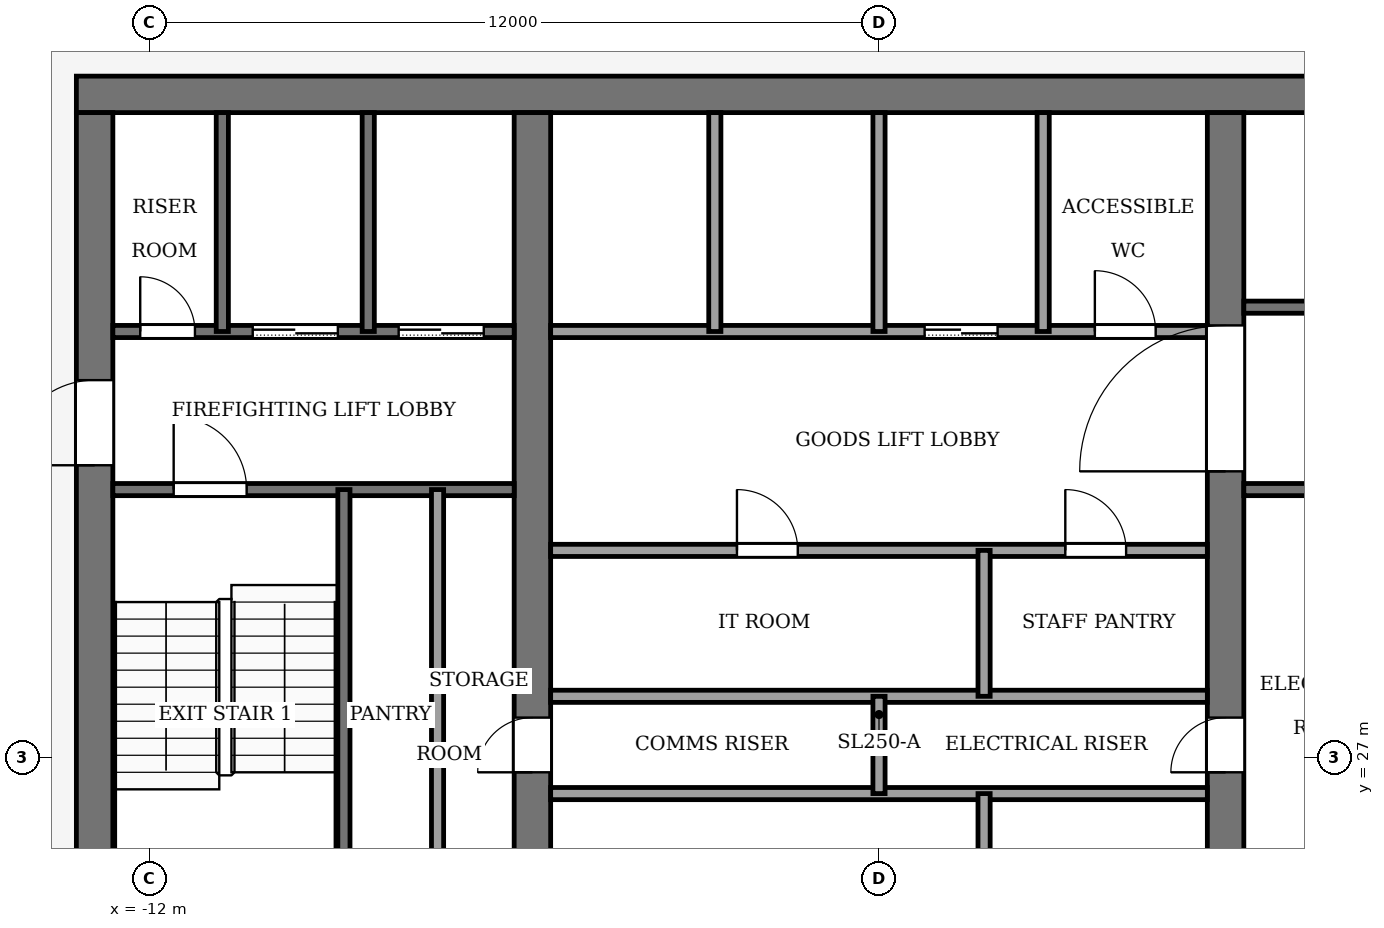
"""IFC4 building model, lengths in metres.
Left out: names, types, materials, properties, quantities, classifications, styles, units other than length and angle.
Written with IfcOpenShell. Run it as: python <this file> out.ifc"""

import sys

from ifc_helpers import new_model, si_unit, direction, frame, frame_2d, origin, place, context, subcontext, project, spatial, rectangle, extrude, element, fill, save


model = new_model("IFC4")
c1 = context("Model", 3, precision=1e-05, world=origin(), true_north=direction((0.0, 1.0)))
c2 = subcontext(c1, "Body", "Model", "MODEL_VIEW")
j1 = project(units=[si_unit("LENGTHUNIT", "METRE"), si_unit("PLANEANGLEUNIT", "RADIAN")], contexts=[c1])
p1 = place(None, origin())
s1 = spatial("IfcSite", under=j1, at=p1, CompositionType="ELEMENT")
p2 = place(p1, origin())
s2 = spatial("IfcBuilding", under=s1, at=p2, CompositionType="ELEMENT")
p3 = place(p2, frame((0.0, 0.0, 330.0)))
s3 = spatial("IfcBuildingStorey", under=s2, at=p3, CompositionType="ELEMENT", Elevation=330.0)
p4 = place(p3, frame((-13.2, 37.9, -0.13), z_axis=(0.0, 0.0, 1.0), x_axis=(1.0, 0.0, 0.0)))
e1 = element("IfcWall", 1, at=p4, inside=s3, PredefinedType="SHEAR", context=c2, shape_type="SweptSolid", body=[
    extrude(rectangle(XDim=26.4, YDim=0.6, at=frame_2d((13.2, 0.0))), origin(), (0.0, 0.0, 1.0), 3.95),
])
p5 = place(p3, frame((-12.9, 18.4, -0.13), z_axis=(0.0, 0.0, 1.0), x_axis=(0.0, 1.0, 0.0)))
e2 = element("IfcWall", 2, at=p5, inside=s3, PredefinedType="SHEAR", context=c2, shape_type="SweptSolid", body=[
    extrude(rectangle(XDim=19.2, YDim=0.6, at=frame_2d((9.6, 0.0))), origin(), (0.0, 0.0, 1.0), 3.95),
])
p6 = place(p5, frame((2.8, 0.0, 0.13)))
e3 = element("IfcOpeningElement", 3, at=p6, cuts=e2, PredefinedType="OPENING", context=c2, shape_type="SweptSolid", body=[
    extrude(rectangle(XDim=2.4, YDim=2.4, at=frame_2d((1.2, 1.2))), frame((0.0, 0.31, 0.0), z_axis=(0.0, -1.0, 0.0), x_axis=(1.0, 0.0, 0.0)), (0.0, 0.0, 1.0), 0.62),
])
p7 = place(p5, frame((13.4, 0.0, 0.13)))
e4 = element("IfcOpeningElement", 4, at=p7, cuts=e2, PredefinedType="OPENING", context=c2, shape_type="SweptSolid", body=[
    extrude(rectangle(XDim=1.4, YDim=2.2, at=frame_2d((0.7, 1.1))), frame((0.0, 0.31, 0.0), z_axis=(0.0, -1.0, 0.0), x_axis=(1.0, 0.0, 0.0)), (0.0, 0.0, 1.0), 0.62),
])
p8 = place(p3, frame((-5.7, 18.4, -0.13), z_axis=(0.0, 0.0, 1.0), x_axis=(0.0, 1.0, 0.0)))
e5 = element("IfcWall", 5, at=p8, inside=s3, PredefinedType="SHEAR", context=c2, shape_type="SweptSolid", body=[
    extrude(rectangle(XDim=19.2, YDim=0.6, at=frame_2d((9.6, 0.0))), origin(), (0.0, 0.0, 1.0), 3.95),
])
p9 = place(p8, frame((8.35, 0.0, 0.13)))
e6 = element("IfcOpeningElement", 6, at=p9, cuts=e5, PredefinedType="OPENING", context=c2, shape_type="SweptSolid", body=[
    extrude(rectangle(XDim=0.9, YDim=2.1, at=frame_2d((0.45, 1.05))), frame((0.0, 0.31, 0.0), z_axis=(0.0, -1.0, 0.0), x_axis=(1.0, 0.0, 0.0)), (0.0, 0.0, 1.0), 0.62),
])
p10 = place(p3, frame((5.7, 18.4, -0.13), z_axis=(0.0, 0.0, 1.0), x_axis=(0.0, 1.0, 0.0)))
e7 = element("IfcWall", 7, at=p10, inside=s3, PredefinedType="SHEAR", context=c2, shape_type="SweptSolid", body=[
    extrude(rectangle(XDim=19.2, YDim=0.6, at=frame_2d((9.6, 0.0))), origin(), (0.0, 0.0, 1.0), 3.95),
])
p11 = place(p10, frame((8.35, 0.0, 0.13)))
e8 = element("IfcOpeningElement", 8, at=p11, cuts=e7, PredefinedType="OPENING", context=c2, shape_type="SweptSolid", body=[
    extrude(rectangle(XDim=0.9, YDim=2.1, at=frame_2d((0.45, 1.05))), frame((0.0, 0.31, 0.0), z_axis=(0.0, -1.0, 0.0), x_axis=(1.0, 0.0, 0.0)), (0.0, 0.0, 1.0), 0.62),
])
p12 = place(p10, frame((13.3, 0.0, 0.13)))
e9 = element("IfcOpeningElement", 9, at=p12, cuts=e7, PredefinedType="OPENING", context=c2, shape_type="SweptSolid", body=[
    extrude(rectangle(XDim=2.4, YDim=2.4, at=frame_2d((1.2, 1.2))), frame((0.0, 0.31, 0.0), z_axis=(0.0, -1.0, 0.0), x_axis=(1.0, 0.0, 0.0)), (0.0, 0.0, 1.0), 0.62),
])
for number, where, z_axis, x_axis in (
    (10, (-5.4, 26.4, 0.0), (0.0, 0.0, 1.0), (1.0, 0.0, 0.0)),
    (11, (-5.4, 28.0, 0.0), (0.0, 0.0, 1.0), (1.0, 0.0, 0.0)),
):
    element("IfcWall", number, at=place(p3, frame(where, z_axis=z_axis, x_axis=x_axis)), inside=s3, PredefinedType="PARTITIONING", context=c2, shape_type="SweptSolid", body=[
        extrude(rectangle(XDim=10.8, YDim=0.2, at=frame_2d((5.4, 0.0))), origin(), (0.0, 0.0, 1.0), 3.82),
    ])
p13 = place(p3, frame((-5.4, 30.4, 0.0), z_axis=(0.0, 0.0, 1.0), x_axis=(1.0, 0.0, 0.0)))
e12 = element("IfcWall", 12, at=p13, inside=s3, PredefinedType="PARTITIONING", context=c2, shape_type="SweptSolid", body=[
    extrude(rectangle(XDim=10.8, YDim=0.2, at=frame_2d((5.4, 0.0))), origin(), (0.0, 0.0, 1.0), 3.82),
])
p14 = place(p13, frame((3.064, 0.0, 0.0)))
e13 = element("IfcOpeningElement", 13, at=p14, cuts=e12, PredefinedType="OPENING", context=c2, shape_type="SweptSolid", body=[
    extrude(rectangle(XDim=1.0, YDim=2.1, at=frame_2d((0.5, 1.05))), frame((0.0, 0.11, 0.0), z_axis=(0.0, -1.0, 0.0), x_axis=(1.0, 0.0, 0.0)), (0.0, 0.0, 1.0), 0.22),
])
p15 = place(p13, frame((8.464, 0.0, 0.0)))
e14 = element("IfcOpeningElement", 14, at=p15, cuts=e12, PredefinedType="OPENING", context=c2, shape_type="SweptSolid", body=[
    extrude(rectangle(XDim=1.0, YDim=2.1, at=frame_2d((0.5, 1.05))), frame((0.0, 0.11, 0.0), z_axis=(0.0, -1.0, 0.0), x_axis=(1.0, 0.0, 0.0)), (0.0, 0.0, 1.0), 0.22),
])
p16 = place(p3, frame((-12.6, 31.4, 0.0), z_axis=(0.0, 0.0, 1.0), x_axis=(1.0, 0.0, 0.0)))
e15 = element("IfcWall", 15, at=p16, inside=s3, PredefinedType="PARTITIONING", context=c2, shape_type="SweptSolid", body=[
    extrude(rectangle(XDim=6.6, YDim=0.2, at=frame_2d((3.3, 0.0))), origin(), (0.0, 0.0, 1.0), 3.82),
])
p17 = place(p16, frame((1.0, 0.0, 0.0)))
e16 = element("IfcOpeningElement", 16, at=p17, cuts=e15, PredefinedType="OPENING", context=c2, shape_type="SweptSolid", body=[
    extrude(rectangle(XDim=1.2, YDim=2.2, at=frame_2d((0.6, 1.1))), frame((0.0, 0.11, 0.0), z_axis=(0.0, -1.0, 0.0), x_axis=(1.0, 0.0, 0.0)), (0.0, 0.0, 1.0), 0.22),
])
p18 = place(p3, frame((6.0, 31.4, 0.0), z_axis=(0.0, 0.0, 1.0), x_axis=(1.0, 0.0, 0.0)))
e17 = element("IfcWall", 17, at=p18, inside=s3, PredefinedType="PARTITIONING", context=c2, shape_type="SweptSolid", body=[
    extrude(rectangle(XDim=6.6, YDim=0.2, at=frame_2d((3.3, 0.0))), origin(), (0.0, 0.0, 1.0), 3.82),
])
p19 = place(p3, frame((-12.6, 34.0, 0.0), z_axis=(0.0, 0.0, 1.0), x_axis=(1.0, 0.0, 0.0)))
e18 = element("IfcWall", 18, at=p19, inside=s3, PredefinedType="PARTITIONING", context=c2, shape_type="SweptSolid", body=[
    extrude(rectangle(XDim=6.6, YDim=0.2, at=frame_2d((3.3, 0.0))), origin(), (0.0, 0.0, 1.0), 3.82),
])
p20 = place(p19, frame((4.7, 0.0, 0.0)))
e19 = element("IfcOpeningElement", 19, at=p20, cuts=e18, PredefinedType="OPENING", context=c2, shape_type="SweptSolid", body=[
    extrude(rectangle(XDim=1.4, YDim=2.2, at=frame_2d((0.7, 1.1))), frame((0.0, 0.11, 0.0), z_axis=(0.0, -1.0, 0.0), x_axis=(1.0, 0.0, 0.0)), (0.0, 0.0, 1.0), 0.22),
])
p21 = place(p19, frame((2.3, 0.0, 0.0)))
e20 = element("IfcOpeningElement", 20, at=p21, cuts=e18, PredefinedType="OPENING", context=c2, shape_type="SweptSolid", body=[
    extrude(rectangle(XDim=1.4, YDim=2.2, at=frame_2d((0.7, 1.1))), frame((0.0, 0.11, 0.0), z_axis=(0.0, -1.0, 0.0), x_axis=(1.0, 0.0, 0.0)), (0.0, 0.0, 1.0), 0.22),
])
p22 = place(p19, frame((0.45, 0.0, 0.0)))
e21 = element("IfcOpeningElement", 21, at=p22, cuts=e18, PredefinedType="OPENING", context=c2, shape_type="SweptSolid", body=[
    extrude(rectangle(XDim=0.9, YDim=2.1, at=frame_2d((0.45, 1.05))), frame((0.0, 0.11, 0.0), z_axis=(0.0, -1.0, 0.0), x_axis=(1.0, 0.0, 0.0)), (0.0, 0.0, 1.0), 0.22),
])
p23 = place(p3, frame((-5.4, 34.0, 0.0), z_axis=(0.0, 0.0, 1.0), x_axis=(1.0, 0.0, 0.0)))
e22 = element("IfcWall", 22, at=p23, inside=s3, PredefinedType="PARTITIONING", context=c2, shape_type="SweptSolid", body=[
    extrude(rectangle(XDim=10.8, YDim=0.2, at=frame_2d((5.4, 0.0))), origin(), (0.0, 0.0, 1.0), 3.82),
])
p24 = place(p23, frame((6.15, 0.0, 0.0)))
e23 = element("IfcOpeningElement", 23, at=p24, cuts=e22, PredefinedType="OPENING", context=c2, shape_type="SweptSolid", body=[
    extrude(rectangle(XDim=1.2, YDim=2.2, at=frame_2d((0.6, 1.1))), frame((0.0, 0.11, 0.0), z_axis=(0.0, -1.0, 0.0), x_axis=(1.0, 0.0, 0.0)), (0.0, 0.0, 1.0), 0.22),
])
p25 = place(p23, frame((8.95, 0.0, 0.0)))
e24 = element("IfcOpeningElement", 24, at=p25, cuts=e22, PredefinedType="OPENING", context=c2, shape_type="SweptSolid", body=[
    extrude(rectangle(XDim=1.0, YDim=2.1, at=frame_2d((0.5, 1.05))), frame((0.0, 0.11, 0.0), z_axis=(0.0, -1.0, 0.0), x_axis=(1.0, 0.0, 0.0)), (0.0, 0.0, 1.0), 0.22),
])
p26 = place(p3, frame((6.0, 34.4, 0.0), z_axis=(0.0, 0.0, 1.0), x_axis=(1.0, 0.0, 0.0)))
e25 = element("IfcWall", 25, at=p26, inside=s3, PredefinedType="PARTITIONING", context=c2, shape_type="SweptSolid", body=[
    extrude(rectangle(XDim=6.6, YDim=0.2, at=frame_2d((3.3, 0.0))), origin(), (0.0, 0.0, 1.0), 3.82),
])
p27 = place(p26, frame((4.8, 0.0, 0.0)))
e26 = element("IfcOpeningElement", 26, at=p27, cuts=e25, PredefinedType="OPENING", context=c2, shape_type="SweptSolid", body=[
    extrude(rectangle(XDim=1.2, YDim=2.2, at=frame_2d((0.6, 1.1))), frame((0.0, 0.11, 0.0), z_axis=(0.0, -1.0, 0.0), x_axis=(1.0, 0.0, 0.0)), (0.0, 0.0, 1.0), 0.22),
])
p28 = place(p3, frame((-10.8, 34.0, 0.0), z_axis=(0.0, 0.0, 1.0), x_axis=(0.0, 1.0, 0.0)))
e27 = element("IfcWall", 27, at=p28, inside=s3, PredefinedType="PARTITIONING", context=c2, shape_type="SweptSolid", body=[
    extrude(rectangle(XDim=3.6, YDim=0.2, at=frame_2d((1.8, 0.0))), origin(), (0.0, 0.0, 1.0), 3.82),
])
p29 = place(p3, frame((-8.8, 24.0, 0.0), z_axis=(0.0, 0.0, 1.0), x_axis=(0.0, 1.0, 0.0)))
e28 = element("IfcWall", 28, at=p29, inside=s3, PredefinedType="PARTITIONING", context=c2, shape_type="SweptSolid", body=[
    extrude(rectangle(XDim=7.4, YDim=0.2, at=frame_2d((3.7, 0.0))), origin(), (0.0, 0.0, 1.0), 3.82),
])
p30 = place(p3, frame((-8.4, 34.0, 0.0), z_axis=(0.0, 0.0, 1.0), x_axis=(0.0, 1.0, 0.0)))
e29 = element("IfcWall", 29, at=p30, inside=s3, PredefinedType="PARTITIONING", context=c2, shape_type="SweptSolid", body=[
    extrude(rectangle(XDim=3.6, YDim=0.2, at=frame_2d((1.8, 0.0))), origin(), (0.0, 0.0, 1.0), 3.82),
])
p31 = place(p3, frame((-7.26, 24.0, 0.0), z_axis=(0.0, 0.0, 1.0), x_axis=(0.0, 1.0, 0.0)))
e30 = element("IfcWall", 30, at=p31, inside=s3, PredefinedType="PARTITIONING", context=c2, shape_type="SweptSolid", body=[
    extrude(rectangle(XDim=7.4, YDim=0.2, at=frame_2d((3.7, 0.0))), origin(), (0.0, 0.0, 1.0), 3.82),
])
p32 = place(p3, frame((-2.7, 34.0, 0.0), z_axis=(0.0, 0.0, 1.0), x_axis=(0.0, 1.0, 0.0)))
e31 = element("IfcWall", 31, at=p32, inside=s3, PredefinedType="PARTITIONING", context=c2, shape_type="SweptSolid", body=[
    extrude(rectangle(XDim=3.6, YDim=0.2, at=frame_2d((1.8, 0.0))), origin(), (0.0, 0.0, 1.0), 3.82),
])
p33 = place(p3, frame((0.0, 26.4, 0.0), z_axis=(0.0, 0.0, 1.0), x_axis=(0.0, 1.0, 0.0)))
e32 = element("IfcWall", 32, at=p33, inside=s3, PredefinedType="PARTITIONING", context=c2, shape_type="SweptSolid", body=[
    extrude(rectangle(XDim=1.6, YDim=0.2, at=frame_2d((0.8, 0.0))), origin(), (0.0, 0.0, 1.0), 3.82),
])
p34 = place(p3, frame((0.0, 34.0, 0.0), z_axis=(0.0, 0.0, 1.0), x_axis=(0.0, 1.0, 0.0)))
e33 = element("IfcWall", 33, at=p34, inside=s3, PredefinedType="PARTITIONING", context=c2, shape_type="SweptSolid", body=[
    extrude(rectangle(XDim=3.6, YDim=0.2, at=frame_2d((1.8, 0.0))), origin(), (0.0, 0.0, 1.0), 3.82),
])
for number, where, z_axis, x_axis in (
    (34, (1.728, 24.0, 0.0), (0.0, 0.0, 1.0), (0.0, 1.0, 0.0)),
    (35, (1.728, 28.0, 0.0), (0.0, 0.0, 1.0), (0.0, 1.0, 0.0)),
):
    element("IfcWall", number, at=place(p3, frame(where, z_axis=z_axis, x_axis=x_axis)), inside=s3, PredefinedType="PARTITIONING", context=c2, shape_type="SweptSolid", body=[
        extrude(rectangle(XDim=2.4, YDim=0.2, at=frame_2d((1.2, 0.0))), origin(), (0.0, 0.0, 1.0), 3.82),
    ])
p35 = place(p3, frame((2.7, 34.0, 0.0), z_axis=(0.0, 0.0, 1.0), x_axis=(0.0, 1.0, 0.0)))
e36 = element("IfcWall", 36, at=p35, inside=s3, PredefinedType="PARTITIONING", context=c2, shape_type="SweptSolid", body=[
    extrude(rectangle(XDim=3.6, YDim=0.2, at=frame_2d((1.8, 0.0))), origin(), (0.0, 0.0, 1.0), 3.82),
])
p36 = place(p24, origin())
e37 = element("IfcDoor", 37, at=p36, inside=s3, OperationType="SLIDING_TO_LEFT", PredefinedType="DOOR", context=c2, shape_type="SweptSolid", body=[
    extrude(rectangle(XDim=1.2, YDim=2.2, at=frame_2d((0.6, 1.1))), frame((0.0, 0.025, 0.0), z_axis=(0.0, -1.0, 0.0), x_axis=(1.0, 0.0, 0.0)), (0.0, 0.0, 1.0), 0.05),
])
fill(e23, e37)
p37 = place(p20, origin())
e38 = element("IfcDoor", 38, at=p37, inside=s3, OperationType="SLIDING_TO_LEFT", PredefinedType="DOOR", context=c2, shape_type="SweptSolid", body=[
    extrude(rectangle(XDim=1.4, YDim=2.2, at=frame_2d((0.7, 1.1))), frame((0.0, 0.025, 0.0), z_axis=(0.0, -1.0, 0.0), x_axis=(1.0, 0.0, 0.0)), (0.0, 0.0, 1.0), 0.05),
])
fill(e19, e38)
p38 = place(p21, origin())
e39 = element("IfcDoor", 39, at=p38, inside=s3, OperationType="SLIDING_TO_LEFT", PredefinedType="DOOR", context=c2, shape_type="SweptSolid", body=[
    extrude(rectangle(XDim=1.4, YDim=2.2, at=frame_2d((0.7, 1.1))), frame((0.0, 0.025, 0.0), z_axis=(0.0, -1.0, 0.0), x_axis=(1.0, 0.0, 0.0)), (0.0, 0.0, 1.0), 0.05),
])
fill(e20, e39)
p39 = place(p22, origin())
e40 = element("IfcDoor", 40, at=p39, inside=s3, OperationType="SINGLE_SWING_RIGHT", PredefinedType="DOOR", context=c2, shape_type="SweptSolid", body=[
    extrude(rectangle(XDim=0.9, YDim=2.1, at=frame_2d((0.45, 1.05))), frame((0.0, 0.025, 0.0), z_axis=(0.0, -1.0, 0.0), x_axis=(1.0, 0.0, 0.0)), (0.0, 0.0, 1.0), 0.05),
])
fill(e21, e40)
p40 = place(p14, origin())
e41 = element("IfcDoor", 41, at=p40, inside=s3, OperationType="SINGLE_SWING_RIGHT", PredefinedType="DOOR", context=c2, shape_type="SweptSolid", body=[
    extrude(rectangle(XDim=1.0, YDim=2.1, at=frame_2d((0.5, 1.05))), frame((0.0, 0.025, 0.0), z_axis=(0.0, -1.0, 0.0), x_axis=(1.0, 0.0, 0.0)), (0.0, 0.0, 1.0), 0.05),
])
fill(e13, e41)
p41 = place(p15, origin())
e42 = element("IfcDoor", 42, at=p41, inside=s3, OperationType="SINGLE_SWING_LEFT", PredefinedType="DOOR", context=c2, shape_type="SweptSolid", body=[
    extrude(rectangle(XDim=1.0, YDim=2.1, at=frame_2d((0.5, 1.05))), frame((0.0, 0.025, 0.0), z_axis=(0.0, -1.0, 0.0), x_axis=(1.0, 0.0, 0.0)), (0.0, 0.0, 1.0), 0.05),
])
fill(e14, e42)
p42 = place(p25, origin())
e43 = element("IfcDoor", 43, at=p42, inside=s3, OperationType="SINGLE_SWING_LEFT", PredefinedType="DOOR", context=c2, shape_type="SweptSolid", body=[
    extrude(rectangle(XDim=1.0, YDim=2.1, at=frame_2d((0.5, 1.05))), frame((0.0, 0.025, 0.0), z_axis=(0.0, -1.0, 0.0), x_axis=(1.0, 0.0, 0.0)), (0.0, 0.0, 1.0), 0.05),
])
fill(e24, e43)
p43 = place(p9, origin())
e44 = element("IfcDoor", 44, at=p43, inside=s3, OperationType="SINGLE_SWING_LEFT", PredefinedType="DOOR", context=c2, shape_type="SweptSolid", body=[
    extrude(rectangle(XDim=0.9, YDim=2.1, at=frame_2d((0.45, 1.05))), frame((0.0, 0.025, 0.0), z_axis=(0.0, -1.0, 0.0), x_axis=(1.0, 0.0, 0.0)), (0.0, 0.0, 1.0), 0.05),
])
fill(e6, e44)
p44 = place(p11, origin())
e45 = element("IfcDoor", 45, at=p44, inside=s3, OperationType="SINGLE_SWING_RIGHT", PredefinedType="DOOR", context=c2, shape_type="SweptSolid", body=[
    extrude(rectangle(XDim=0.9, YDim=2.1, at=frame_2d((0.45, 1.05))), frame((0.0, 0.025, 0.0), z_axis=(0.0, -1.0, 0.0), x_axis=(1.0, 0.0, 0.0)), (0.0, 0.0, 1.0), 0.05),
])
fill(e8, e45)
p45 = place(p17, origin())
e46 = element("IfcDoor", 46, at=p45, inside=s3, OperationType="SINGLE_SWING_RIGHT", PredefinedType="DOOR", context=c2, shape_type="SweptSolid", body=[
    extrude(rectangle(XDim=1.2, YDim=2.2, at=frame_2d((0.6, 1.1))), frame((0.0, 0.025, 0.0), z_axis=(0.0, -1.0, 0.0), x_axis=(1.0, 0.0, 0.0)), (0.0, 0.0, 1.0), 0.05),
])
fill(e16, e46)
p46 = place(p12, origin())
e47 = element("IfcDoor", 47, at=p46, inside=s3, OperationType="DOUBLE_DOOR_SINGLE_SWING", PredefinedType="DOOR", context=c2, shape_type="SweptSolid", body=[
    extrude(rectangle(XDim=2.4, YDim=2.4, at=frame_2d((1.2, 1.2))), frame((0.0, 0.025, 0.0), z_axis=(0.0, -1.0, 0.0), x_axis=(1.0, 0.0, 0.0)), (0.0, 0.0, 1.0), 0.05),
])
fill(e9, e47)
p47 = place(p7, origin())
e48 = element("IfcDoor", 48, at=p47, inside=s3, OperationType="SINGLE_SWING_RIGHT", PredefinedType="DOOR", context=c2, shape_type="SweptSolid", body=[
    extrude(rectangle(XDim=1.4, YDim=2.2, at=frame_2d((0.7, 1.1))), frame((0.0, 0.025, 0.0), z_axis=(0.0, -1.0, 0.0), x_axis=(1.0, 0.0, 0.0)), (0.0, 0.0, 1.0), 0.05),
])
fill(e4, e48)
save(model, sys.argv[1])
